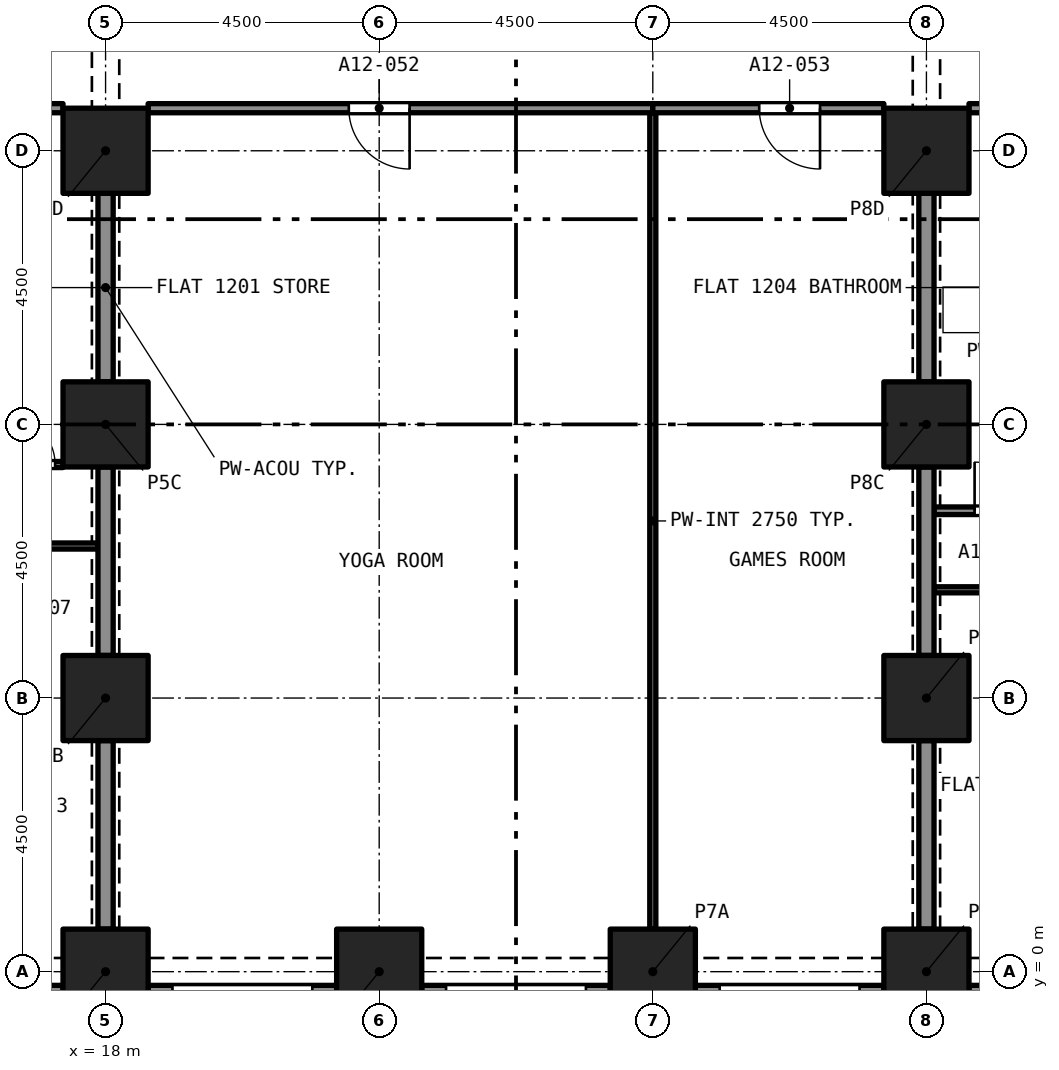
"""IFC4 building model, lengths in metres.
Left out: names, types, materials, properties, quantities, classifications, styles, units other than length and angle.
Written with IfcOpenShell. Run it as: python <this file> out.ifc"""

import sys

from ifc_helpers import new_model, si_unit, direction, frame, frame_2d, origin, origin_2d, place, context, subcontext, project, spatial, rectangle, extrude, element, fill, save


model = new_model("IFC4")
c1 = context("Model", 3, precision=1e-05, world=origin(), true_north=direction((0.0, 1.0)))
c2 = subcontext(c1, "Body", "Model", "MODEL_VIEW")
j1 = project(units=[si_unit("LENGTHUNIT", "METRE"), si_unit("PLANEANGLEUNIT", "RADIAN")], contexts=[c1])
p1 = place(None, origin())
s1 = spatial("IfcSite", under=j1, at=p1, CompositionType="ELEMENT")
p2 = place(p1, origin())
s2 = spatial("IfcBuilding", under=s1, at=p2, CompositionType="ELEMENT")
p3 = place(p2, frame((0.0, 0.0, 49.6)))
s3 = spatial("IfcBuildingStorey", under=s2, at=p3, CompositionType="ELEMENT", Elevation=49.6)
for number, where, z_axis, x_axis in (
    (1, (18.0, 0.0, 0.0), (0.0, 0.0, 1.0), (1.0, 0.0, 0.0)),
    (2, (22.5, 0.0, 0.0), (0.0, 0.0, 1.0), (1.0, 0.0, 0.0)),
    (3, (27.0, 0.0, 0.0), (0.0, 0.0, 1.0), (1.0, 0.0, 0.0)),
    (4, (31.5, 0.0, 0.0), (0.0, 0.0, 1.0), (1.0, 0.0, 0.0)),
    (5, (18.0, 4.5, 0.0), (0.0, 0.0, 1.0), (1.0, 0.0, 0.0)),
    (6, (31.5, 4.5, 0.0), (0.0, 0.0, 1.0), (1.0, 0.0, 0.0)),
    (7, (18.0, 9.0, 0.0), (0.0, 0.0, 1.0), (1.0, 0.0, 0.0)),
    (8, (31.5, 9.0, 0.0), (0.0, 0.0, 1.0), (1.0, 0.0, 0.0)),
    (9, (18.0, 13.5, 0.0), (0.0, 0.0, 1.0), (1.0, 0.0, 0.0)),
    (10, (31.5, 13.5, 0.0), (0.0, 0.0, 1.0), (1.0, 0.0, 0.0)),
):
    element("IfcColumn", number, at=place(p3, frame(where, z_axis=z_axis, x_axis=x_axis)), inside=s3, PredefinedType="COLUMN", context=c2, shape_type="SweptSolid", body=[
        extrude(rectangle(XDim=1.4, YDim=1.4, at=origin_2d()), origin(), (0.0, 0.0, 1.0), 3.2),
    ])
p4 = place(p3, frame((17.3, -0.375, 0.0), z_axis=(0.0, 0.0, 1.0), x_axis=(-1.0, 0.0, 0.0)))
e11 = element("IfcWall", 11, at=p4, inside=s3, PredefinedType="SOLIDWALL", context=c2, shape_type="SweptSolid", body=[
    extrude(rectangle(XDim=3.1, YDim=0.3, at=frame_2d((1.55, 0.0))), origin(), (0.0, 0.0, 1.0), 3.2),
])
p5 = place(p4, frame((0.4, 0.0, 0.45)))
e12 = element("IfcOpeningElement", 12, at=p5, cuts=e11, PredefinedType="OPENING", context=c2, shape_type="SweptSolid", body=[
    extrude(rectangle(XDim=2.3, YDim=1.95, at=frame_2d((1.15, 0.975))), frame((0.0, 0.16, 0.0), z_axis=(0.0, -1.0, 0.0), x_axis=(1.0, 0.0, 0.0)), (0.0, 0.0, 1.0), 0.32),
])
p6 = place(p3, frame((21.8, -0.375, 0.0), z_axis=(0.0, 0.0, 1.0), x_axis=(-1.0, 0.0, 0.0)))
e13 = element("IfcWall", 13, at=p6, inside=s3, PredefinedType="SOLIDWALL", context=c2, shape_type="SweptSolid", body=[
    extrude(rectangle(XDim=3.1, YDim=0.3, at=frame_2d((1.55, 0.0))), origin(), (0.0, 0.0, 1.0), 3.2),
])
p7 = place(p6, frame((0.4, 0.0, 0.45)))
e14 = element("IfcOpeningElement", 14, at=p7, cuts=e13, PredefinedType="OPENING", context=c2, shape_type="SweptSolid", body=[
    extrude(rectangle(XDim=2.3, YDim=1.95, at=frame_2d((1.15, 0.975))), frame((0.0, 0.16, 0.0), z_axis=(0.0, -1.0, 0.0), x_axis=(1.0, 0.0, 0.0)), (0.0, 0.0, 1.0), 0.32),
])
p8 = place(p3, frame((26.3, -0.375, 0.0), z_axis=(0.0, 0.0, 1.0), x_axis=(-1.0, 0.0, 0.0)))
e15 = element("IfcWall", 15, at=p8, inside=s3, PredefinedType="SOLIDWALL", context=c2, shape_type="SweptSolid", body=[
    extrude(rectangle(XDim=3.1, YDim=0.3, at=frame_2d((1.55, 0.0))), origin(), (0.0, 0.0, 1.0), 3.2),
])
p9 = place(p8, frame((0.4, 0.0, 0.45)))
e16 = element("IfcOpeningElement", 16, at=p9, cuts=e15, PredefinedType="OPENING", context=c2, shape_type="SweptSolid", body=[
    extrude(rectangle(XDim=2.3, YDim=1.95, at=frame_2d((1.15, 0.975))), frame((0.0, 0.16, 0.0), z_axis=(0.0, -1.0, 0.0), x_axis=(1.0, 0.0, 0.0)), (0.0, 0.0, 1.0), 0.32),
])
p10 = place(p3, frame((30.8, -0.375, 0.0), z_axis=(0.0, 0.0, 1.0), x_axis=(-1.0, 0.0, 0.0)))
e17 = element("IfcWall", 17, at=p10, inside=s3, PredefinedType="SOLIDWALL", context=c2, shape_type="SweptSolid", body=[
    extrude(rectangle(XDim=3.1, YDim=0.3, at=frame_2d((1.55, 0.0))), origin(), (0.0, 0.0, 1.0), 3.2),
])
p11 = place(p10, frame((0.4, 0.0, 0.45)))
e18 = element("IfcOpeningElement", 18, at=p11, cuts=e17, PredefinedType="OPENING", context=c2, shape_type="SweptSolid", body=[
    extrude(rectangle(XDim=2.3, YDim=1.95, at=frame_2d((1.15, 0.975))), frame((0.0, 0.16, 0.0), z_axis=(0.0, -1.0, 0.0), x_axis=(1.0, 0.0, 0.0)), (0.0, 0.0, 1.0), 0.32),
])
p12 = place(p3, frame((35.3, -0.375, 0.0), z_axis=(0.0, 0.0, 1.0), x_axis=(-1.0, 0.0, 0.0)))
e19 = element("IfcWall", 19, at=p12, inside=s3, PredefinedType="SOLIDWALL", context=c2, shape_type="SweptSolid", body=[
    extrude(rectangle(XDim=3.1, YDim=0.3, at=frame_2d((1.55, 0.0))), origin(), (0.0, 0.0, 1.0), 3.2),
])
p13 = place(p12, frame((0.4, 0.0, 0.45)))
e20 = element("IfcOpeningElement", 20, at=p13, cuts=e19, PredefinedType="OPENING", context=c2, shape_type="SweptSolid", body=[
    extrude(rectangle(XDim=2.3, YDim=1.95, at=frame_2d((1.15, 0.975))), frame((0.0, 0.16, 0.0), z_axis=(0.0, -1.0, 0.0), x_axis=(1.0, 0.0, 0.0)), (0.0, 0.0, 1.0), 0.32),
])
p14 = place(p3, frame((17.875, 7.0, 0.0), z_axis=(0.0, 0.0, 1.0), x_axis=(-1.0, 0.0, 0.0)))
e21 = element("IfcWall", 21, at=p14, inside=s3, PredefinedType="PARTITIONING", context=c2, shape_type="SweptSolid", body=[
    extrude(rectangle(XDim=4.375, YDim=0.1, at=frame_2d((2.188, 0.0))), origin(), (0.0, 0.0, 1.0), 2.9),
])
p15 = place(p14, frame((1.675, 0.0, 0.0)))
e22 = element("IfcOpeningElement", 22, at=p15, cuts=e21, PredefinedType="OPENING", context=c2, shape_type="SweptSolid", body=[
    extrude(rectangle(XDim=0.9, YDim=2.1, at=frame_2d((0.45, 1.05))), frame((0.0, 0.06, 0.0), z_axis=(0.0, -1.0, 0.0), x_axis=(1.0, 0.0, 0.0)), (0.0, 0.0, 1.0), 0.12),
])
for number, where, z_axis, x_axis in (
    (23, (18.0, 5.2, 0.0), (0.0, 0.0, 1.0), (0.0, 1.0, 0.0)),
    (24, (18.0, 0.7, 0.0), (0.0, 0.0, 1.0), (0.0, 1.0, 0.0)),
):
    element("IfcWall", number, at=place(p3, frame(where, z_axis=z_axis, x_axis=x_axis)), inside=s3, PredefinedType="PARTITIONING", context=c2, shape_type="SweptSolid", body=[
        extrude(rectangle(XDim=3.1, YDim=0.25, at=frame_2d((1.55, 0.0))), origin(), (0.0, 0.0, 1.0), 2.38),
    ])
p16 = place(p3, frame((16.107, 8.34, 0.0), z_axis=(0.0, 0.0, 1.0), x_axis=(1.0, 0.0, 0.0)))
e25 = element("IfcWall", 25, at=p16, inside=s3, PredefinedType="PARTITIONING", context=c2, shape_type="SweptSolid", body=[
    extrude(rectangle(XDim=1.193, YDim=0.1, at=frame_2d((0.596, 0.0))), origin(), (0.0, 0.0, 1.0), 2.9),
])
p17 = place(p16, frame((0.263, 0.0, 0.0)))
e26 = element("IfcOpeningElement", 26, at=p17, cuts=e25, PredefinedType="OPENING", context=c2, shape_type="SweptSolid", body=[
    extrude(rectangle(XDim=0.8, YDim=2.1, at=frame_2d((0.4, 1.05))), frame((0.0, 0.06, 0.0), z_axis=(0.0, -1.0, 0.0), x_axis=(1.0, 0.0, 0.0)), (0.0, 0.0, 1.0), 0.12),
])
p18 = place(p3, frame((11.85, 14.2, 0.0), z_axis=(0.0, 0.0, 1.0), x_axis=(1.0, 0.0, 0.0)))
e27 = element("IfcWall", 27, at=p18, inside=s3, PredefinedType="PARTITIONING", context=c2, shape_type="SweptSolid", body=[
    extrude(rectangle(XDim=5.45, YDim=0.15, at=frame_2d((2.725, 0.0))), origin(), (0.0, 0.0, 1.0), 2.9),
])
p19 = place(p3, frame((18.0, 9.7, 0.0), z_axis=(0.0, 0.0, 1.0), x_axis=(0.0, 1.0, 0.0)))
e28 = element("IfcWall", 28, at=p19, inside=s3, PredefinedType="PARTITIONING", context=c2, shape_type="SweptSolid", body=[
    extrude(rectangle(XDim=3.1, YDim=0.25, at=frame_2d((1.55, 0.0))), origin(), (0.0, 0.0, 1.0), 2.38),
])
p20 = place(p3, frame((31.625, 7.58, 0.0), z_axis=(0.0, 0.0, 1.0), x_axis=(1.0, 0.0, 0.0)))
e29 = element("IfcWall", 29, at=p20, inside=s3, PredefinedType="PARTITIONING", context=c2, shape_type="SweptSolid", body=[
    extrude(rectangle(XDim=2.059, YDim=0.125, at=frame_2d((1.03, 0.0))), origin(), (0.0, 0.0, 1.0), 2.9),
])
p21 = place(p20, frame((0.667, 0.0, 0.0)))
e30 = element("IfcOpeningElement", 30, at=p21, cuts=e29, PredefinedType="OPENING", context=c2, shape_type="SweptSolid", body=[
    extrude(rectangle(XDim=0.8, YDim=2.1, at=frame_2d((0.4, 1.05))), frame((0.0, 0.073, 0.0), z_axis=(0.0, -1.0, 0.0), x_axis=(1.0, 0.0, 0.0)), (0.0, 0.0, 1.0), 0.145),
])
p22 = place(p3, frame((31.5, 9.7, 0.0), z_axis=(0.0, 0.0, 1.0), x_axis=(0.0, 1.0, 0.0)))
e31 = element("IfcWall", 31, at=p22, inside=s3, PredefinedType="PARTITIONING", context=c2, shape_type="SweptSolid", body=[
    extrude(rectangle(XDim=3.1, YDim=0.25, at=frame_2d((1.55, 0.0))), origin(), (0.0, 0.0, 1.0), 2.38),
])
p23 = place(p3, frame((32.2, 14.2, 0.0), z_axis=(0.0, 0.0, 1.0), x_axis=(1.0, 0.0, 0.0)))
e32 = element("IfcWall", 32, at=p23, inside=s3, PredefinedType="PARTITIONING", context=c2, shape_type="SweptSolid", body=[
    extrude(rectangle(XDim=3.2, YDim=0.15, at=frame_2d((1.6, 0.0))), origin(), (0.0, 0.0, 1.0), 2.9),
])
p24 = place(p3, frame((36.0, 6.28, 0.0), z_axis=(0.0, 0.0, 1.0), x_axis=(-1.0, 0.0, 0.0)))
e33 = element("IfcWall", 33, at=p24, inside=s3, PredefinedType="PARTITIONING", context=c2, shape_type="SweptSolid", body=[
    extrude(rectangle(XDim=4.375, YDim=0.1, at=frame_2d((2.188, 0.0))), origin(), (0.0, 0.0, 1.0), 2.9),
])
p25 = place(p24, frame((1.75, 0.0, 0.0)))
e34 = element("IfcOpeningElement", 34, at=p25, cuts=e33, PredefinedType="OPENING", context=c2, shape_type="SweptSolid", body=[
    extrude(rectangle(XDim=1.0, YDim=2.1, at=frame_2d((0.5, 1.05))), frame((0.0, 0.06, 0.0), z_axis=(0.0, -1.0, 0.0), x_axis=(1.0, 0.0, 0.0)), (0.0, 0.0, 1.0), 0.12),
])
for number, where, z_axis, x_axis in (
    (35, (31.5, 0.7, 0.0), (0.0, 0.0, 1.0), (0.0, 1.0, 0.0)),
    (36, (31.5, 5.2, 0.0), (0.0, 0.0, 1.0), (0.0, 1.0, 0.0)),
):
    element("IfcWall", number, at=place(p3, frame(where, z_axis=z_axis, x_axis=x_axis)), inside=s3, PredefinedType="PARTITIONING", context=c2, shape_type="SweptSolid", body=[
        extrude(rectangle(XDim=3.1, YDim=0.25, at=frame_2d((1.55, 0.0))), origin(), (0.0, 0.0, 1.0), 2.38),
    ])
p26 = place(p3, frame((27.0, 0.7, 0.0), z_axis=(0.0, 0.0, 1.0), x_axis=(0.0, 1.0, 0.0)))
e37 = element("IfcWall", 37, at=p26, inside=s3, PredefinedType="PARTITIONING", context=c2, shape_type="SweptSolid", body=[
    extrude(rectangle(XDim=13.425, YDim=0.1, at=frame_2d((6.712, 0.0))), origin(), (0.0, 0.0, 1.0), 2.75),
])
p27 = place(p3, frame((27.0, 14.2, 0.0), z_axis=(0.0, 0.0, 1.0), x_axis=(-1.0, 0.0, 0.0)))
e38 = element("IfcWall", 38, at=p27, inside=s3, PredefinedType="PARTITIONING", context=c2, shape_type="SweptSolid", body=[
    extrude(rectangle(XDim=8.3, YDim=0.15, at=frame_2d((4.15, 0.0))), origin(), (0.0, 0.0, 1.0), 2.75),
])
p28 = place(p27, frame((4.0, 0.0, 0.0)))
e39 = element("IfcOpeningElement", 39, at=p28, cuts=e38, PredefinedType="OPENING", context=c2, shape_type="SweptSolid", body=[
    extrude(rectangle(XDim=1.0, YDim=2.1, at=frame_2d((0.5, 1.05))), frame((0.0, 0.085, 0.0), z_axis=(0.0, -1.0, 0.0), x_axis=(1.0, 0.0, 0.0)), (0.0, 0.0, 1.0), 0.17),
])
p29 = place(p3, frame((30.8, 14.2, 0.0), z_axis=(0.0, 0.0, 1.0), x_axis=(-1.0, 0.0, 0.0)))
e40 = element("IfcWall", 40, at=p29, inside=s3, PredefinedType="PARTITIONING", context=c2, shape_type="SweptSolid", body=[
    extrude(rectangle(XDim=3.8, YDim=0.15, at=frame_2d((1.9, 0.0))), origin(), (0.0, 0.0, 1.0), 2.75),
])
p30 = place(p29, frame((1.05, 0.0, 0.0)))
e41 = element("IfcOpeningElement", 41, at=p30, cuts=e40, PredefinedType="OPENING", context=c2, shape_type="SweptSolid", body=[
    extrude(rectangle(XDim=1.0, YDim=2.1, at=frame_2d((0.5, 1.05))), frame((0.0, 0.085, 0.0), z_axis=(0.0, -1.0, 0.0), x_axis=(1.0, 0.0, 0.0)), (0.0, 0.0, 1.0), 0.17),
])
p31 = place(p17, origin())
e42 = element("IfcDoor", 42, at=p31, inside=s3, OperationType="SINGLE_SWING_RIGHT", PredefinedType="DOOR", context=c2, shape_type="SweptSolid", body=[
    extrude(rectangle(XDim=0.8, YDim=2.1, at=frame_2d((0.4, 1.05))), frame((0.0, 0.025, 0.0), z_axis=(0.0, -1.0, 0.0), x_axis=(1.0, 0.0, 0.0)), (0.0, 0.0, 1.0), 0.05),
])
fill(e26, e42)
p32 = place(p21, origin())
e43 = element("IfcDoor", 43, at=p32, inside=s3, OperationType="SINGLE_SWING_RIGHT", PredefinedType="DOOR", context=c2, shape_type="SweptSolid", body=[
    extrude(rectangle(XDim=0.8, YDim=2.1, at=frame_2d((0.4, 1.05))), frame((0.0, 0.025, 0.0), z_axis=(0.0, -1.0, 0.0), x_axis=(1.0, 0.0, 0.0)), (0.0, 0.0, 1.0), 0.05),
])
fill(e30, e43)
p33 = place(p28, origin())
e44 = element("IfcDoor", 44, at=p33, inside=s3, OperationType="SINGLE_SWING_RIGHT", PredefinedType="DOOR", context=c2, shape_type="SweptSolid", body=[
    extrude(rectangle(XDim=1.0, YDim=2.1, at=frame_2d((0.5, 1.05))), frame((0.0, 0.025, 0.0), z_axis=(0.0, -1.0, 0.0), x_axis=(1.0, 0.0, 0.0)), (0.0, 0.0, 1.0), 0.05),
])
fill(e39, e44)
p34 = place(p30, origin())
e45 = element("IfcDoor", 45, at=p34, inside=s3, OperationType="SINGLE_SWING_LEFT", PredefinedType="DOOR", context=c2, shape_type="SweptSolid", body=[
    extrude(rectangle(XDim=1.0, YDim=2.1, at=frame_2d((0.5, 1.05))), frame((0.0, 0.025, 0.0), z_axis=(0.0, -1.0, 0.0), x_axis=(1.0, 0.0, 0.0)), (0.0, 0.0, 1.0), 0.05),
])
fill(e41, e45)
save(model, sys.argv[1])
